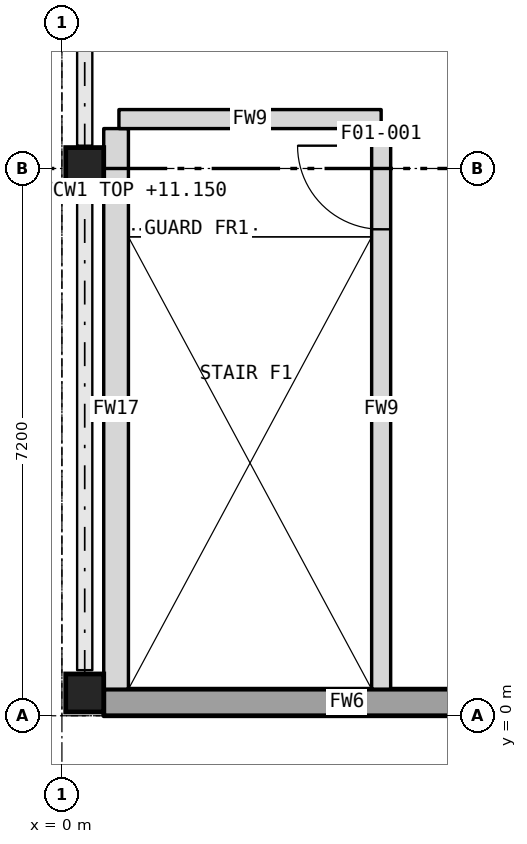
"""IFC4 building model, lengths in metres.
Left out: names, types, materials, properties, quantities, classifications, styles, units other than length and angle.
Written with IfcOpenShell. Run it as: python <this file> out.ifc"""

import sys

from ifc_helpers import new_model, si_unit, direction, frame, frame_2d, origin, origin_2d, place, context, subcontext, project, spatial, rectangle, extrude, element, fill, save


model = new_model("IFC4")
c1 = context("Model", 3, precision=1e-05, world=origin(), true_north=direction((0.0, 1.0)))
c2 = subcontext(c1, "Body", "Model", "MODEL_VIEW")
j1 = project(units=[si_unit("LENGTHUNIT", "METRE"), si_unit("PLANEANGLEUNIT", "RADIAN")], contexts=[c1])
p1 = place(None, origin())
s1 = spatial("IfcSite", under=j1, at=p1, CompositionType="ELEMENT")
p2 = place(p1, origin())
s2 = spatial("IfcBuilding", under=s1, at=p2, CompositionType="ELEMENT")
p3 = place(p2, frame((0.0, 0.0, 6.0)))
s3 = spatial("IfcBuildingStorey", under=s2, at=p3, CompositionType="ELEMENT", Elevation=6.0)
p4 = place(p3, frame((0.3, 0.3, 0.0), z_axis=(0.0, 0.0, 1.0), x_axis=(1.0, 0.0, 0.0)))
e1 = element("IfcColumn", 1, at=p4, inside=s3, PredefinedType="COLUMN", context=c2, shape_type="SweptSolid", body=[
    extrude(rectangle(XDim=0.5, YDim=0.5, at=origin_2d()), origin(), (0.0, 0.0, 1.0), 6.0),
])
p5 = place(p3, frame((0.3, 7.2, 0.0), z_axis=(0.0, 0.0, 1.0), x_axis=(1.0, 0.0, 0.0)))
e2 = element("IfcColumn", 2, at=p5, inside=s3, PredefinedType="COLUMN", context=c2, shape_type="SweptSolid", body=[
    extrude(rectangle(XDim=0.5, YDim=0.55, at=origin_2d()), origin(), (0.0, 0.0, 1.0), 6.0),
])
p6 = place(p3, frame((0.55, 0.175, 0.0), z_axis=(0.0, 0.0, 1.0), x_axis=(1.0, 0.0, 0.0)))
e3 = element("IfcWall", 3, at=p6, inside=s3, PredefinedType="SOLIDWALL", context=c2, shape_type="SweptSolid", body=[
    extrude(rectangle(XDim=6.4, YDim=0.35, at=frame_2d((3.2, 0.0))), origin(), (0.0, 0.0, 1.0), 5.75),
])
p7 = place(p3, frame((0.712, 0.35, 0.0), z_axis=(0.0, 0.0, 1.0), x_axis=(0.0, 1.0, 0.0)))
e4 = element("IfcWall", 4, at=p7, inside=s3, PredefinedType="SOLIDWALL", context=c2, shape_type="SweptSolid", body=[
    extrude(rectangle(XDim=7.375, YDim=0.325, at=frame_2d((3.688, 0.0))), origin(), (0.0, 0.0, 1.0), 5.75),
])
p8 = place(p3, frame((4.2, 0.35, 0.0), z_axis=(0.0, 0.0, 1.0), x_axis=(0.0, 1.0, 0.0)))
e5 = element("IfcWall", 5, at=p8, inside=s3, PredefinedType="SOLIDWALL", context=c2, shape_type="SweptSolid", body=[
    extrude(rectangle(XDim=7.375, YDim=0.25, at=frame_2d((3.688, 0.0))), origin(), (0.0, 0.0, 1.0), 5.75),
])
p9 = place(p8, frame((6.05, 0.0, 0.0)))
e6 = element("IfcOpeningElement", 6, at=p9, cuts=e5, PredefinedType="OPENING", context=c2, shape_type="SweptSolid", body=[
    extrude(rectangle(XDim=1.1, YDim=2.1, at=frame_2d((0.55, 1.05))), frame((0.0, 0.135, 0.0), z_axis=(0.0, -1.0, 0.0), x_axis=(1.0, 0.0, 0.0)), (0.0, 0.0, 1.0), 0.27),
])
p10 = place(p3, frame((0.75, 7.85, 0.0), z_axis=(0.0, 0.0, 1.0), x_axis=(1.0, 0.0, 0.0)))
e7 = element("IfcWall", 7, at=p10, inside=s3, PredefinedType="SOLIDWALL", context=c2, shape_type="SweptSolid", body=[
    extrude(rectangle(XDim=3.45, YDim=0.25, at=frame_2d((1.725, 0.0))), origin(), (0.0, 0.0, 1.0), 5.75),
])
p11 = place(p9, origin())
e8 = element("IfcDoor", 8, at=p11, inside=s3, OperationType="SINGLE_SWING_RIGHT", PredefinedType="DOOR", context=c2, shape_type="SweptSolid", body=[
    extrude(rectangle(XDim=1.1, YDim=2.1, at=frame_2d((0.55, 1.05))), frame((0.0, 0.025, 0.0), z_axis=(0.0, -1.0, 0.0), x_axis=(1.0, 0.0, 0.0)), (0.0, 0.0, 1.0), 0.05),
])
fill(e6, e8)
save(model, sys.argv[1])
